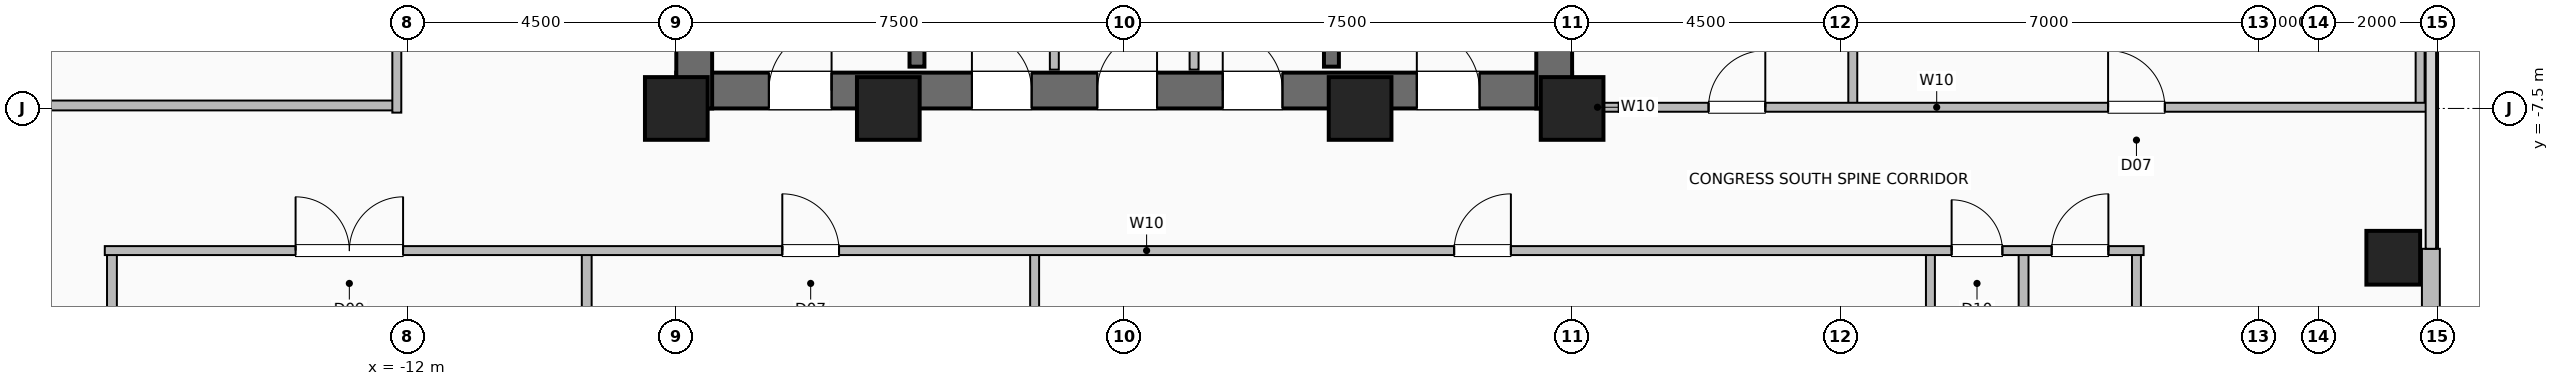
"""IFC4 building model, lengths in metres.
Left out: names, types, materials, properties, quantities, classifications, styles, units other than length and angle.
Written with IfcOpenShell. Run it as: python <this file> out.ifc"""

import sys

from ifc_helpers import new_model, si_unit, direction, frame, frame_2d, origin, origin_2d, place, context, subcontext, project, spatial, rectangle, hollow_rectangle, extrude, element, fill, save


model = new_model("IFC4")
c1 = context("Model", 3, precision=1e-05, world=origin(), true_north=direction((0.0, 1.0)))
c2 = subcontext(c1, "Body", "Model", "MODEL_VIEW")
j1 = project(units=[si_unit("LENGTHUNIT", "METRE"), si_unit("PLANEANGLEUNIT", "RADIAN")], contexts=[c1])
p1 = place(None, origin())
s1 = spatial("IfcSite", under=j1, at=p1, CompositionType="ELEMENT")
p2 = place(p1, origin())
s2 = spatial("IfcBuilding", under=s1, at=p2, CompositionType="ELEMENT")
p3 = place(p2, frame((0.0, 0.0, 101.2)))
s3 = spatial("IfcBuildingStorey", under=s2, at=p3, CompositionType="ELEMENT", Elevation=101.2)
for number, where, z_axis, x_axis in (
    (1, (-7.5, -7.5, 0.0), (0.0, 0.0, 1.0), (1.0, 0.0, 0.0)),
    (2, (-3.95, -7.5, 0.0), (0.0, 0.0, 1.0), (1.0, 0.0, 0.0)),
    (3, (3.95, -7.5, 0.0), (0.0, 0.0, 1.0), (1.0, 0.0, 0.0)),
    (4, (7.5, -7.5, 0.0), (0.0, 0.0, 1.0), (1.0, 0.0, 0.0)),
):
    element("IfcColumn", number, at=place(p3, frame(where, z_axis=z_axis, x_axis=x_axis)), inside=s3, PredefinedType="COLUMN", context=c2, shape_type="SweptSolid", body=[
        extrude(hollow_rectangle(XDim=1.05, YDim=1.05, WallThickness=0.05, at=origin_2d()), origin(), (0.0, 0.0, 1.0), 3.6),
    ])
p4 = place(p3, frame((21.25, -10.0, 0.0), z_axis=(0.0, 0.0, 1.0), x_axis=(1.0, 0.0, 0.0)))
e5 = element("IfcColumn", 5, at=p4, inside=s3, PredefinedType="COLUMN", context=c2, shape_type="SweptSolid", body=[
    extrude(hollow_rectangle(XDim=0.9, YDim=0.9, WallThickness=0.045, at=origin_2d()), origin(), (0.0, 0.0, 1.0), 3.6),
])
p5 = place(p3, frame((21.88, -16.15, 0.0), z_axis=(0.0, 0.0, 1.0), x_axis=(0.0, 1.0, 0.0)))
e6 = element("IfcWall", 6, at=p5, inside=s3, PredefinedType="SOLIDWALL", context=c2, shape_type="SweptSolid", body=[
    extrude(rectangle(XDim=6.3, YDim=0.3, at=frame_2d((3.15, 0.0))), origin(), (0.0, 0.0, 1.0), 3.36),
])
p6 = place(p3, frame((-7.5, -7.2, 0.0), z_axis=(0.0, 0.0, 1.0), x_axis=(1.0, 0.0, 0.0)))
e7 = element("IfcWall", 7, at=p6, inside=s3, PredefinedType="SHEAR", context=c2, shape_type="SweptSolid", body=[
    extrude(rectangle(XDim=15.0, YDim=0.6, at=frame_2d((7.5, 0.0))), origin(), (0.0, 0.0, 1.0), 3.36),
])
p7 = place(p6, frame((1.55, 0.0, 0.0)))
e8 = element("IfcOpeningElement", 8, at=p7, cuts=e7, PredefinedType="OPENING", context=c2, shape_type="SweptSolid", body=[
    extrude(rectangle(XDim=1.05, YDim=2.08, at=frame_2d((0.525, 1.04))), frame((0.0, 0.31, 0.0), z_axis=(0.0, -1.0, 0.0), x_axis=(1.0, 0.0, 0.0)), (0.0, 0.0, 1.0), 0.62),
])
p8 = place(p6, frame((12.4, 0.0, 0.0)))
e9 = element("IfcOpeningElement", 9, at=p8, cuts=e7, PredefinedType="OPENING", context=c2, shape_type="SweptSolid", body=[
    extrude(rectangle(XDim=1.05, YDim=2.08, at=frame_2d((0.525, 1.04))), frame((0.0, 0.31, 0.0), z_axis=(0.0, -1.0, 0.0), x_axis=(1.0, 0.0, 0.0)), (0.0, 0.0, 1.0), 0.62),
])
p9 = place(p6, frame((4.95, 0.0, 0.0)))
e10 = element("IfcOpeningElement", 10, at=p9, cuts=e7, PredefinedType="OPENING", context=c2, shape_type="SweptSolid", body=[
    extrude(rectangle(XDim=1.0, YDim=2.08, at=frame_2d((0.5, 1.04))), frame((0.0, 0.31, 0.0), z_axis=(0.0, -1.0, 0.0), x_axis=(1.0, 0.0, 0.0)), (0.0, 0.0, 1.0), 0.62),
])
p10 = place(p6, frame((7.05, 0.0, 0.0)))
e11 = element("IfcOpeningElement", 11, at=p10, cuts=e7, PredefinedType="OPENING", context=c2, shape_type="SweptSolid", body=[
    extrude(rectangle(XDim=1.0, YDim=2.08, at=frame_2d((0.5, 1.04))), frame((0.0, 0.31, 0.0), z_axis=(0.0, -1.0, 0.0), x_axis=(1.0, 0.0, 0.0)), (0.0, 0.0, 1.0), 0.62),
])
p11 = place(p6, frame((9.15, 0.0, 0.0)))
e12 = element("IfcOpeningElement", 12, at=p11, cuts=e7, PredefinedType="OPENING", context=c2, shape_type="SweptSolid", body=[
    extrude(rectangle(XDim=1.0, YDim=2.08, at=frame_2d((0.5, 1.04))), frame((0.0, 0.31, 0.0), z_axis=(0.0, -1.0, 0.0), x_axis=(1.0, 0.0, 0.0)), (0.0, 0.0, 1.0), 0.62),
])
p12 = place(p3, frame((-7.2, -7.5, 0.0), z_axis=(0.0, 0.0, 1.0), x_axis=(0.0, 1.0, 0.0)))
e13 = element("IfcWall", 13, at=p12, inside=s3, PredefinedType="SHEAR", context=c2, shape_type="SweptSolid", body=[
    extrude(rectangle(XDim=15.0, YDim=0.6, at=frame_2d((7.5, 0.0))), origin(), (0.0, 0.0, 1.0), 3.36),
])
p13 = place(p12, frame((9.5, 0.0, 0.0)))
e14 = element("IfcOpeningElement", 14, at=p13, cuts=e13, PredefinedType="OPENING", context=c2, shape_type="SweptSolid", body=[
    extrude(rectangle(XDim=1.0, YDim=2.08, at=frame_2d((0.5, 1.04))), frame((0.0, 0.31, 0.0), z_axis=(0.0, -1.0, 0.0), x_axis=(1.0, 0.0, 0.0)), (0.0, 0.0, 1.0), 0.62),
])
p14 = place(p3, frame((7.2, -7.5, 0.0), z_axis=(0.0, 0.0, 1.0), x_axis=(0.0, 1.0, 0.0)))
e15 = element("IfcWall", 15, at=p14, inside=s3, PredefinedType="SHEAR", context=c2, shape_type="SweptSolid", body=[
    extrude(rectangle(XDim=15.0, YDim=0.6, at=frame_2d((7.5, 0.0))), origin(), (0.0, 0.0, 1.0), 3.36),
])
for number, where, z_axis, x_axis in (
    (16, (-3.47, -6.8, 0.0), (0.0, 0.0, 1.0), (0.0, 1.0, 0.0)),
    (17, (3.47, -6.8, 0.0), (0.0, 0.0, 1.0), (0.0, 1.0, 0.0)),
):
    element("IfcWall", number, at=place(p3, frame(where, z_axis=z_axis, x_axis=x_axis)), inside=s3, PredefinedType="SHEAR", context=c2, shape_type="SweptSolid", body=[
        extrude(rectangle(XDim=7.72, YDim=0.25, at=frame_2d((3.86, 0.0))), origin(), (0.0, 0.0, 1.0), 3.36),
    ])
for number, where, z_axis, x_axis in (
    (18, (-1.17, -6.85, 0.0), (0.0, 0.0, 1.0), (0.0, 1.0, 0.0)),
    (19, (1.17, -6.85, 0.0), (0.0, 0.0, 1.0), (0.0, 1.0, 0.0)),
):
    element("IfcWall", number, at=place(p3, frame(where, z_axis=z_axis, x_axis=x_axis)), inside=s3, PredefinedType="PARTITIONING", context=c2, shape_type="SweptSolid", body=[
        extrude(rectangle(XDim=4.42, YDim=0.15, at=frame_2d((2.21, 0.0))), origin(), (0.0, 0.0, 1.0), 3.36),
    ])
for number, where, z_axis, x_axis in (
    (20, (15.06, -21.82, 0.0), (0.0, 0.0, 1.0), (0.0, 1.0, 0.0)),
    (21, (-16.95, -21.82, 0.0), (0.0, 0.0, 1.0), (0.0, 1.0, 0.0)),
    (22, (-9.0, -21.82, 0.0), (0.0, 0.0, 1.0), (0.0, 1.0, 0.0)),
):
    element("IfcWall", number, at=place(p3, frame(where, z_axis=z_axis, x_axis=x_axis)), inside=s3, PredefinedType="PLUMBINGWALL", context=c2, shape_type="SweptSolid", body=[
        extrude(rectangle(XDim=11.94, YDim=0.165, at=frame_2d((5.97, 0.0))), origin(), (0.0, 0.0, 1.0), 3.36),
    ])
for number, where, z_axis, x_axis in (
    (23, (-1.5, -21.82, 0.0), (0.0, 0.0, 1.0), (0.0, 1.0, 0.0)),
    (24, (13.5, -21.82, 0.0), (0.0, 0.0, 1.0), (0.0, 1.0, 0.0)),
    (25, (16.95, -21.82, 0.0), (0.0, 0.0, 1.0), (0.0, 1.0, 0.0)),
):
    element("IfcWall", number, at=place(p3, frame(where, z_axis=z_axis, x_axis=x_axis)), inside=s3, PredefinedType="PARTITIONING", context=c2, shape_type="SweptSolid", body=[
        extrude(rectangle(XDim=11.94, YDim=0.15, at=frame_2d((5.97, 0.0))), origin(), (0.0, 0.0, 1.0), 3.36),
    ])
p15 = place(p3, frame((-17.07, -9.88, 0.0), z_axis=(0.0, 0.0, 1.0), x_axis=(1.0, 0.0, 0.0)))
e26 = element("IfcWall", 26, at=p15, inside=s3, PredefinedType="PARTITIONING", context=c2, shape_type="SweptSolid", body=[
    extrude(rectangle(XDim=34.14, YDim=0.15, at=frame_2d((17.07, 0.0))), origin(), (0.0, 0.0, 1.0), 3.36),
])
p16 = place(p15, frame((3.195, 0.0, 0.0)))
e27 = element("IfcOpeningElement", 27, at=p16, cuts=e26, PredefinedType="OPENING", context=c2, shape_type="SweptSolid", body=[
    extrude(rectangle(XDim=1.8, YDim=2.08, at=frame_2d((0.9, 1.04))), frame((0.0, 0.085, 0.0), z_axis=(0.0, -1.0, 0.0), x_axis=(1.0, 0.0, 0.0)), (0.0, 0.0, 1.0), 0.17),
])
p17 = place(p15, frame((11.345, 0.0, 0.0)))
e28 = element("IfcOpeningElement", 28, at=p17, cuts=e26, PredefinedType="OPENING", context=c2, shape_type="SweptSolid", body=[
    extrude(rectangle(XDim=0.95, YDim=2.06, at=frame_2d((0.475, 1.03))), frame((0.0, 0.085, 0.0), z_axis=(0.0, -1.0, 0.0), x_axis=(1.0, 0.0, 0.0)), (0.0, 0.0, 1.0), 0.17),
])
p18 = place(p15, frame((22.595, 0.0, 0.0)))
e29 = element("IfcOpeningElement", 29, at=p18, cuts=e26, PredefinedType="OPENING", context=c2, shape_type="SweptSolid", body=[
    extrude(rectangle(XDim=0.95, YDim=2.06, at=frame_2d((0.475, 1.03))), frame((0.0, 0.085, 0.0), z_axis=(0.0, -1.0, 0.0), x_axis=(1.0, 0.0, 0.0)), (0.0, 0.0, 1.0), 0.17),
])
p19 = place(p15, frame((30.925, 0.0, 0.0)))
e30 = element("IfcOpeningElement", 30, at=p19, cuts=e26, PredefinedType="OPENING", context=c2, shape_type="SweptSolid", body=[
    extrude(rectangle(XDim=0.85, YDim=2.05, at=frame_2d((0.425, 1.025))), frame((0.0, 0.085, 0.0), z_axis=(0.0, -1.0, 0.0), x_axis=(1.0, 0.0, 0.0)), (0.0, 0.0, 1.0), 0.17),
])
p20 = place(p15, frame((32.6, 0.0, 0.0)))
e31 = element("IfcOpeningElement", 31, at=p20, cuts=e26, PredefinedType="OPENING", context=c2, shape_type="SweptSolid", body=[
    extrude(rectangle(XDim=0.95, YDim=2.06, at=frame_2d((0.475, 1.03))), frame((0.0, 0.085, 0.0), z_axis=(0.0, -1.0, 0.0), x_axis=(1.0, 0.0, 0.0)), (0.0, 0.0, 1.0), 0.17),
])
p21 = place(p3, frame((-21.82, -7.45, 0.0), z_axis=(0.0, 0.0, 1.0), x_axis=(1.0, 0.0, 0.0)))
e32 = element("IfcWall", 32, at=p21, inside=s3, PredefinedType="PLUMBINGWALL", context=c2, shape_type="SweptSolid", body=[
    extrude(rectangle(XDim=9.64, YDim=0.165, at=frame_2d((4.82, 0.0))), origin(), (0.0, 0.0, 1.0), 3.36),
])
p22 = place(p3, frame((-12.18, -7.57, 0.0), z_axis=(0.0, 0.0, 1.0), x_axis=(0.0, 1.0, 0.0)))
e33 = element("IfcWall", 33, at=p22, inside=s3, PredefinedType="PARTITIONING", context=c2, shape_type="SweptSolid", body=[
    extrude(rectangle(XDim=15.14, YDim=0.15, at=frame_2d((7.57, 0.0))), origin(), (0.0, 0.0, 1.0), 3.36),
])
p23 = place(p22, frame((2.62, 0.0, 0.0)))
e34 = element("IfcOpeningElement", 34, at=p23, cuts=e33, PredefinedType="OPENING", context=c2, shape_type="SweptSolid", body=[
    extrude(rectangle(XDim=0.95, YDim=2.06, at=frame_2d((0.475, 1.03))), frame((0.0, 0.085, 0.0), z_axis=(0.0, -1.0, 0.0), x_axis=(1.0, 0.0, 0.0)), (0.0, 0.0, 1.0), 0.17),
])
p24 = place(p22, frame((8.845, 0.0, 0.0)))
e35 = element("IfcOpeningElement", 35, at=p24, cuts=e33, PredefinedType="OPENING", context=c2, shape_type="SweptSolid", body=[
    extrude(rectangle(XDim=0.95, YDim=2.06, at=frame_2d((0.475, 1.03))), frame((0.0, 0.085, 0.0), z_axis=(0.0, -1.0, 0.0), x_axis=(1.0, 0.0, 0.0)), (0.0, 0.0, 1.0), 0.17),
])
p25 = place(p22, frame((13.37, 0.0, 0.0)))
e36 = element("IfcOpeningElement", 36, at=p25, cuts=e33, PredefinedType="OPENING", context=c2, shape_type="SweptSolid", body=[
    extrude(rectangle(XDim=0.85, YDim=2.05, at=frame_2d((0.425, 1.025))), frame((0.0, 0.085, 0.0), z_axis=(0.0, -1.0, 0.0), x_axis=(1.0, 0.0, 0.0)), (0.0, 0.0, 1.0), 0.17),
])
p26 = place(p3, frame((7.45, -7.48, 0.0), z_axis=(0.0, 0.0, 1.0), x_axis=(1.0, 0.0, 0.0)))
e37 = element("IfcWall", 37, at=p26, inside=s3, PredefinedType="PARTITIONING", context=c2, shape_type="SweptSolid", body=[
    extrude(rectangle(XDim=0.95, YDim=0.15, at=frame_2d((0.475, 0.0))), origin(), (0.0, 0.0, 1.0), 3.36),
])
for number, where, z_axis, x_axis in (
    (38, (12.2, -7.48, 0.0), (0.0, 0.0, 1.0), (0.0, 1.0, 0.0)),
    (39, (21.7, -7.48, 0.0), (0.0, 0.0, 1.0), (0.0, 1.0, 0.0)),
):
    element("IfcWall", number, at=place(p3, frame(where, z_axis=z_axis, x_axis=x_axis)), inside=s3, PredefinedType="PARTITIONING", context=c2, shape_type="SweptSolid", body=[
        extrude(rectangle(XDim=14.88, YDim=0.15, at=frame_2d((7.44, 0.0))), origin(), (0.0, 0.0, 1.0), 3.36),
    ])
p27 = place(p3, frame((8.28, -7.48, 0.0), z_axis=(0.0, 0.0, 1.0), x_axis=(1.0, 0.0, 0.0)))
e40 = element("IfcWall", 40, at=p27, inside=s3, PredefinedType="PARTITIONING", context=c2, shape_type="SweptSolid", body=[
    extrude(rectangle(XDim=13.54, YDim=0.15, at=frame_2d((6.77, 0.0))), origin(), (0.0, 0.0, 1.0), 3.36),
])
p28 = place(p27, frame((1.505, 0.0, 0.0)))
e41 = element("IfcOpeningElement", 41, at=p28, cuts=e40, PredefinedType="OPENING", context=c2, shape_type="SweptSolid", body=[
    extrude(rectangle(XDim=0.95, YDim=2.06, at=frame_2d((0.475, 1.03))), frame((0.0, 0.085, 0.0), z_axis=(0.0, -1.0, 0.0), x_axis=(1.0, 0.0, 0.0)), (0.0, 0.0, 1.0), 0.17),
])
p29 = place(p27, frame((8.195, 0.0, 0.0)))
e42 = element("IfcOpeningElement", 42, at=p29, cuts=e40, PredefinedType="OPENING", context=c2, shape_type="SweptSolid", body=[
    extrude(rectangle(XDim=0.95, YDim=2.06, at=frame_2d((0.475, 1.03))), frame((0.0, 0.085, 0.0), z_axis=(0.0, -1.0, 0.0), x_axis=(1.0, 0.0, 0.0)), (0.0, 0.0, 1.0), 0.17),
])
p30 = place(p7, origin())
e43 = element("IfcDoor", 43, at=p30, inside=s3, OperationType="SINGLE_SWING_RIGHT", PredefinedType="DOOR", context=c2, shape_type="SweptSolid", body=[
    extrude(rectangle(XDim=1.05, YDim=2.08, at=frame_2d((0.525, 1.04))), frame((0.0, 0.025, 0.0), z_axis=(0.0, -1.0, 0.0), x_axis=(1.0, 0.0, 0.0)), (0.0, 0.0, 1.0), 0.05),
])
fill(e8, e43)
p31 = place(p8, origin())
e44 = element("IfcDoor", 44, at=p31, inside=s3, OperationType="SINGLE_SWING_LEFT", PredefinedType="DOOR", context=c2, shape_type="SweptSolid", body=[
    extrude(rectangle(XDim=1.05, YDim=2.08, at=frame_2d((0.525, 1.04))), frame((0.0, 0.025, 0.0), z_axis=(0.0, -1.0, 0.0), x_axis=(1.0, 0.0, 0.0)), (0.0, 0.0, 1.0), 0.05),
])
fill(e9, e44)
p32 = place(p9, origin())
e45 = element("IfcDoor", 45, at=p32, inside=s3, OperationType="SINGLE_SWING_LEFT", PredefinedType="DOOR", context=c2, shape_type="SweptSolid", body=[
    extrude(rectangle(XDim=1.0, YDim=2.08, at=frame_2d((0.5, 1.04))), frame((0.0, 0.025, 0.0), z_axis=(0.0, -1.0, 0.0), x_axis=(1.0, 0.0, 0.0)), (0.0, 0.0, 1.0), 0.05),
])
fill(e10, e45)
p33 = place(p10, origin())
e46 = element("IfcDoor", 46, at=p33, inside=s3, OperationType="SINGLE_SWING_RIGHT", PredefinedType="DOOR", context=c2, shape_type="SweptSolid", body=[
    extrude(rectangle(XDim=1.0, YDim=2.08, at=frame_2d((0.5, 1.04))), frame((0.0, 0.025, 0.0), z_axis=(0.0, -1.0, 0.0), x_axis=(1.0, 0.0, 0.0)), (0.0, 0.0, 1.0), 0.05),
])
fill(e11, e46)
p34 = place(p11, origin())
e47 = element("IfcDoor", 47, at=p34, inside=s3, OperationType="SINGLE_SWING_LEFT", PredefinedType="DOOR", context=c2, shape_type="SweptSolid", body=[
    extrude(rectangle(XDim=1.0, YDim=2.08, at=frame_2d((0.5, 1.04))), frame((0.0, 0.025, 0.0), z_axis=(0.0, -1.0, 0.0), x_axis=(1.0, 0.0, 0.0)), (0.0, 0.0, 1.0), 0.05),
])
fill(e12, e47)
p35 = place(p16, origin())
e48 = element("IfcDoor", 48, at=p35, inside=s3, OperationType="DOUBLE_DOOR_SINGLE_SWING", PredefinedType="DOOR", context=c2, shape_type="SweptSolid", body=[
    extrude(rectangle(XDim=1.8, YDim=2.08, at=frame_2d((0.9, 1.04))), frame((0.0, 0.025, 0.0), z_axis=(0.0, -1.0, 0.0), x_axis=(1.0, 0.0, 0.0)), (0.0, 0.0, 1.0), 0.05),
])
fill(e27, e48)
p36 = place(p17, origin())
e49 = element("IfcDoor", 49, at=p36, inside=s3, OperationType="SINGLE_SWING_LEFT", PredefinedType="DOOR", context=c2, shape_type="SweptSolid", body=[
    extrude(rectangle(XDim=0.95, YDim=2.06, at=frame_2d((0.475, 1.03))), frame((0.0, 0.025, 0.0), z_axis=(0.0, -1.0, 0.0), x_axis=(1.0, 0.0, 0.0)), (0.0, 0.0, 1.0), 0.05),
])
fill(e28, e49)
p37 = place(p18, origin())
e50 = element("IfcDoor", 50, at=p37, inside=s3, OperationType="SINGLE_SWING_RIGHT", PredefinedType="DOOR", context=c2, shape_type="SweptSolid", body=[
    extrude(rectangle(XDim=0.95, YDim=2.06, at=frame_2d((0.475, 1.03))), frame((0.0, 0.025, 0.0), z_axis=(0.0, -1.0, 0.0), x_axis=(1.0, 0.0, 0.0)), (0.0, 0.0, 1.0), 0.05),
])
fill(e29, e50)
p38 = place(p19, origin())
e51 = element("IfcDoor", 51, at=p38, inside=s3, OperationType="SINGLE_SWING_LEFT", PredefinedType="DOOR", context=c2, shape_type="SweptSolid", body=[
    extrude(rectangle(XDim=0.85, YDim=2.05, at=frame_2d((0.425, 1.025))), frame((0.0, 0.025, 0.0), z_axis=(0.0, -1.0, 0.0), x_axis=(1.0, 0.0, 0.0)), (0.0, 0.0, 1.0), 0.05),
])
fill(e30, e51)
p39 = place(p20, origin())
e52 = element("IfcDoor", 52, at=p39, inside=s3, OperationType="SINGLE_SWING_RIGHT", PredefinedType="DOOR", context=c2, shape_type="SweptSolid", body=[
    extrude(rectangle(XDim=0.95, YDim=2.06, at=frame_2d((0.475, 1.03))), frame((0.0, 0.025, 0.0), z_axis=(0.0, -1.0, 0.0), x_axis=(1.0, 0.0, 0.0)), (0.0, 0.0, 1.0), 0.05),
])
fill(e31, e52)
p40 = place(p28, origin())
e53 = element("IfcDoor", 53, at=p40, inside=s3, OperationType="SINGLE_SWING_RIGHT", PredefinedType="DOOR", context=c2, shape_type="SweptSolid", body=[
    extrude(rectangle(XDim=0.95, YDim=2.06, at=frame_2d((0.475, 1.03))), frame((0.0, 0.025, 0.0), z_axis=(0.0, -1.0, 0.0), x_axis=(1.0, 0.0, 0.0)), (0.0, 0.0, 1.0), 0.05),
])
fill(e41, e53)
p41 = place(p29, origin())
e54 = element("IfcDoor", 54, at=p41, inside=s3, OperationType="SINGLE_SWING_LEFT", PredefinedType="DOOR", context=c2, shape_type="SweptSolid", body=[
    extrude(rectangle(XDim=0.95, YDim=2.06, at=frame_2d((0.475, 1.03))), frame((0.0, 0.025, 0.0), z_axis=(0.0, -1.0, 0.0), x_axis=(1.0, 0.0, 0.0)), (0.0, 0.0, 1.0), 0.05),
])
fill(e42, e54)
save(model, sys.argv[1])
